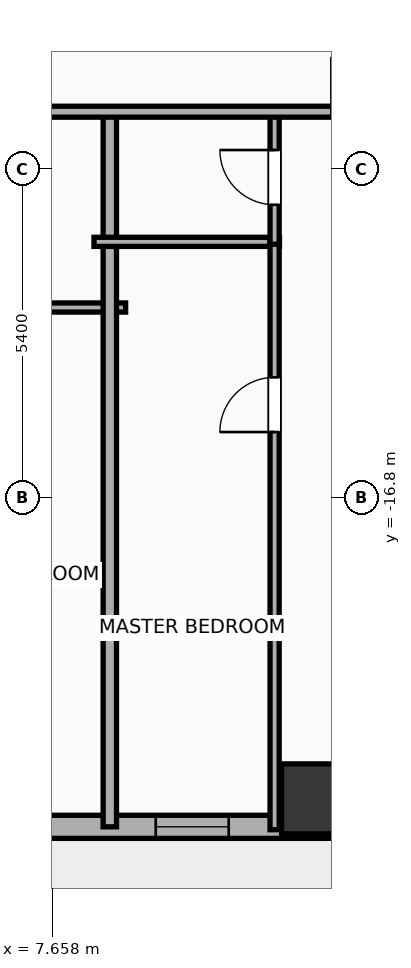
"""IFC4 building model, lengths in metres.
Left out: names, types, materials, properties, quantities, classifications, styles, units other than length and angle.
Written with IfcOpenShell. Run it as: python <this file> out.ifc"""

import sys

from ifc_helpers import new_model, si_unit, direction, frame, frame_2d, origin, origin_2d, place, context, subcontext, project, spatial, rectangle, hollow_rectangle, extrude, element, fill, save


model = new_model("IFC4")
c1 = context("Model", 3, precision=1e-05, world=origin(), true_north=direction((0.0, 1.0)))
c2 = subcontext(c1, "Body", "Model", "MODEL_VIEW")
j1 = project(units=[si_unit("LENGTHUNIT", "METRE"), si_unit("PLANEANGLEUNIT", "RADIAN")], contexts=[c1])
p1 = place(None, origin())
s1 = spatial("IfcSite", under=j1, at=p1, CompositionType="ELEMENT")
p2 = place(p1, origin())
s2 = spatial("IfcBuilding", under=s1, at=p2, CompositionType="ELEMENT")
p3 = place(p2, frame((0.0, 0.0, 26.0)))
s3 = spatial("IfcBuildingStorey", under=s2, at=p3, CompositionType="ELEMENT", Elevation=26.0)
p4 = place(p3, frame((12.0, -21.75, -0.25), z_axis=(0.0, 0.0, 1.0), x_axis=(1.0, 0.0, 0.0)))
e1 = element("IfcColumn", 1, at=p4, inside=s3, PredefinedType="COLUMN", context=c2, shape_type="SweptSolid", body=[
    extrude(hollow_rectangle(XDim=1.15, YDim=1.15, WallThickness=0.04, at=origin_2d()), origin(), (0.0, 0.0, 1.0), 4.15),
])
p5 = place(p3, frame((22.381, -22.21, 0.0), z_axis=(0.0, 0.0, 1.0), x_axis=(-1.0, 0.0, 0.0)))
e2 = element("IfcWall", 2, at=p5, inside=s3, PredefinedType="ELEMENTEDWALL", context=c2, shape_type="SweptSolid", body=[
    extrude(rectangle(XDim=51.963, YDim=0.38, at=frame_2d((25.981, 0.0))), origin(), (0.0, 0.0, 1.0), 2.54),
])
p6 = place(p5, frame((25.231, 0.0, 0.0)))
e3 = element("IfcOpeningElement", 3, at=p6, cuts=e2, PredefinedType="OPENING", context=c2, shape_type="SweptSolid", body=[
    extrude(rectangle(XDim=1.5, YDim=2.05, at=frame_2d((0.75, 1.025))), frame((0.0, 0.2, 0.0), z_axis=(0.0, -1.0, 0.0), x_axis=(1.0, 0.0, 0.0)), (0.0, 0.0, 1.0), 0.4),
])
p7 = place(p5, frame((6.61, 0.0, 0.75)))
e4 = element("IfcOpeningElement", 4, at=p7, cuts=e2, PredefinedType="OPENING", context=c2, shape_type="SweptSolid", body=[
    extrude(rectangle(XDim=2.4, YDim=1.63, at=frame_2d((1.2, 0.815))), frame((0.0, 0.2, 0.0), z_axis=(0.0, -1.0, 0.0), x_axis=(1.0, 0.0, 0.0)), (0.0, 0.0, 1.0), 0.4),
])
p8 = place(p5, frame((49.132, 0.0, 0.75)))
e5 = element("IfcOpeningElement", 5, at=p8, cuts=e2, PredefinedType="OPENING", context=c2, shape_type="SweptSolid", body=[
    extrude(rectangle(XDim=1.2, YDim=1.63, at=frame_2d((0.6, 0.815))), frame((0.0, 0.2, 0.0), z_axis=(0.0, -1.0, 0.0), x_axis=(1.0, 0.0, 0.0)), (0.0, 0.0, 1.0), 0.4),
])
p9 = place(p5, frame((46.086, 0.0, 0.75)))
e6 = element("IfcOpeningElement", 6, at=p9, cuts=e2, PredefinedType="OPENING", context=c2, shape_type="SweptSolid", body=[
    extrude(rectangle(XDim=1.2, YDim=1.63, at=frame_2d((0.6, 0.815))), frame((0.0, 0.2, 0.0), z_axis=(0.0, -1.0, 0.0), x_axis=(1.0, 0.0, 0.0)), (0.0, 0.0, 1.0), 0.4),
])
p10 = place(p5, frame((42.426, 0.0, 0.75)))
e7 = element("IfcOpeningElement", 7, at=p10, cuts=e2, PredefinedType="OPENING", context=c2, shape_type="SweptSolid", body=[
    extrude(rectangle(XDim=1.2, YDim=1.63, at=frame_2d((0.6, 0.815))), frame((0.0, 0.2, 0.0), z_axis=(0.0, -1.0, 0.0), x_axis=(1.0, 0.0, 0.0)), (0.0, 0.0, 1.0), 0.4),
])
p11 = place(p5, frame((38.286, 0.0, 0.75)))
e8 = element("IfcOpeningElement", 8, at=p11, cuts=e2, PredefinedType="OPENING", context=c2, shape_type="SweptSolid", body=[
    extrude(rectangle(XDim=1.2, YDim=1.63, at=frame_2d((0.6, 0.815))), frame((0.0, 0.2, 0.0), z_axis=(0.0, -1.0, 0.0), x_axis=(1.0, 0.0, 0.0)), (0.0, 0.0, 1.0), 0.4),
])
p12 = place(p5, frame((35.219, 0.0, 0.75)))
e9 = element("IfcOpeningElement", 9, at=p12, cuts=e2, PredefinedType="OPENING", context=c2, shape_type="SweptSolid", body=[
    extrude(rectangle(XDim=1.2, YDim=1.63, at=frame_2d((0.6, 0.815))), frame((0.0, 0.2, 0.0), z_axis=(0.0, -1.0, 0.0), x_axis=(1.0, 0.0, 0.0)), (0.0, 0.0, 1.0), 0.4),
])
p13 = place(p5, frame((32.039, 0.0, 0.75)))
e10 = element("IfcOpeningElement", 10, at=p13, cuts=e2, PredefinedType="OPENING", context=c2, shape_type="SweptSolid", body=[
    extrude(rectangle(XDim=1.2, YDim=1.63, at=frame_2d((0.6, 0.815))), frame((0.0, 0.2, 0.0), z_axis=(0.0, -1.0, 0.0), x_axis=(1.0, 0.0, 0.0)), (0.0, 0.0, 1.0), 0.4),
])
p14 = place(p5, frame((22.686, 0.0, 0.75)))
e11 = element("IfcOpeningElement", 11, at=p14, cuts=e2, PredefinedType="OPENING", context=c2, shape_type="SweptSolid", body=[
    extrude(rectangle(XDim=1.2, YDim=1.63, at=frame_2d((0.6, 0.815))), frame((0.0, 0.2, 0.0), z_axis=(0.0, -1.0, 0.0), x_axis=(1.0, 0.0, 0.0)), (0.0, 0.0, 1.0), 0.4),
])
p15 = place(p5, frame((18.786, 0.0, 0.75)))
e12 = element("IfcOpeningElement", 12, at=p15, cuts=e2, PredefinedType="OPENING", context=c2, shape_type="SweptSolid", body=[
    extrude(rectangle(XDim=1.2, YDim=1.63, at=frame_2d((0.6, 0.815))), frame((0.0, 0.2, 0.0), z_axis=(0.0, -1.0, 0.0), x_axis=(1.0, 0.0, 0.0)), (0.0, 0.0, 1.0), 0.4),
])
p16 = place(p5, frame((14.886, 0.0, 0.75)))
e13 = element("IfcOpeningElement", 13, at=p16, cuts=e2, PredefinedType="OPENING", context=c2, shape_type="SweptSolid", body=[
    extrude(rectangle(XDim=1.2, YDim=1.63, at=frame_2d((0.6, 0.815))), frame((0.0, 0.2, 0.0), z_axis=(0.0, -1.0, 0.0), x_axis=(1.0, 0.0, 0.0)), (0.0, 0.0, 1.0), 0.4),
])
p17 = place(p5, frame((11.826, 0.0, 0.75)))
e14 = element("IfcOpeningElement", 14, at=p17, cuts=e2, PredefinedType="OPENING", context=c2, shape_type="SweptSolid", body=[
    extrude(rectangle(XDim=1.2, YDim=1.63, at=frame_2d((0.6, 0.815))), frame((0.0, 0.2, 0.0), z_axis=(0.0, -1.0, 0.0), x_axis=(1.0, 0.0, 0.0)), (0.0, 0.0, 1.0), 0.4),
])
p18 = place(p5, frame((2.836, 0.0, 0.75)))
e15 = element("IfcOpeningElement", 15, at=p18, cuts=e2, PredefinedType="OPENING", context=c2, shape_type="SweptSolid", body=[
    extrude(rectangle(XDim=1.2, YDim=1.63, at=frame_2d((0.6, 0.815))), frame((0.0, 0.2, 0.0), z_axis=(0.0, -1.0, 0.0), x_axis=(1.0, 0.0, 0.0)), (0.0, 0.0, 1.0), 0.4),
])
p19 = place(p3, frame((5.07, -13.67, 0.0), z_axis=(0.0, 0.0, 1.0), x_axis=(1.0, 0.0, 0.0)))
e16 = element("IfcWall", 16, at=p19, inside=s3, PredefinedType="PLUMBINGWALL", context=c2, shape_type="SweptSolid", body=[
    extrude(rectangle(XDim=3.79, YDim=0.15, at=frame_2d((1.895, 0.0))), origin(), (0.0, 0.0, 1.0), 3.65),
])
p20 = place(p3, frame((8.6, -22.21, 0.0), z_axis=(0.0, 0.0, 1.0), x_axis=(0.0, 1.0, 0.0)))
e17 = element("IfcWall", 17, at=p20, inside=s3, PredefinedType="PARTITIONING", context=c2, shape_type="SweptSolid", body=[
    extrude(rectangle(XDim=11.84, YDim=0.22, at=frame_2d((5.92, 0.0))), origin(), (0.0, 0.0, 1.0), 3.65),
])
p21 = place(p3, frame((8.34, -12.59, 0.0), z_axis=(0.0, 0.0, 1.0), x_axis=(1.0, 0.0, 0.0)))
e18 = element("IfcWall", 18, at=p21, inside=s3, PredefinedType="PLUMBINGWALL", context=c2, shape_type="SweptSolid", body=[
    extrude(rectangle(XDim=3.05, YDim=0.15, at=frame_2d((1.525, 0.0))), origin(), (0.0, 0.0, 1.0), 3.65),
])
p22 = place(p3, frame((11.31, -22.258, 0.0), z_axis=(0.0, 0.0, 1.0), x_axis=(0.0, 1.0, 0.0)))
e19 = element("IfcWall", 19, at=p22, inside=s3, PredefinedType="PLUMBINGWALL", context=c2, shape_type="SweptSolid", body=[
    extrude(rectangle(XDim=9.708, YDim=0.15, at=frame_2d((4.854, 0.0))), origin(), (0.0, 0.0, 1.0), 3.65),
])
p23 = place(p22, frame((6.54, 0.0, 0.0)))
e20 = element("IfcOpeningElement", 20, at=p23, cuts=e19, PredefinedType="OPENING", context=c2, shape_type="SweptSolid", body=[
    extrude(rectangle(XDim=0.9, YDim=2.05, at=frame_2d((0.45, 1.025))), frame((0.0, 0.085, 0.0), z_axis=(0.0, -1.0, 0.0), x_axis=(1.0, 0.0, 0.0)), (0.0, 0.0, 1.0), 0.17),
])
p24 = place(p3, frame((11.31, -12.63, 0.0), z_axis=(0.0, 0.0, 1.0), x_axis=(0.0, 1.0, 0.0)))
e21 = element("IfcWall", 21, at=p24, inside=s3, PredefinedType="PLUMBINGWALL", context=c2, shape_type="SweptSolid", body=[
    extrude(rectangle(XDim=2.2, YDim=0.15, at=frame_2d((1.1, 0.0))), origin(), (0.0, 0.0, 1.0), 3.65),
])
p25 = place(p24, frame((0.65, 0.0, 0.0)))
e22 = element("IfcOpeningElement", 22, at=p25, cuts=e21, PredefinedType="OPENING", context=c2, shape_type="SweptSolid", body=[
    extrude(rectangle(XDim=0.9, YDim=2.05, at=frame_2d((0.45, 1.025))), frame((0.0, 0.085, 0.0), z_axis=(0.0, -1.0, 0.0), x_axis=(1.0, 0.0, 0.0)), (0.0, 0.0, 1.0), 0.17),
])
p26 = place(p3, frame((-33.41, -10.45, 0.0), z_axis=(0.0, 0.0, 1.0), x_axis=(1.0, 0.0, 0.0)))
e23 = element("IfcWall", 23, at=p26, inside=s3, PredefinedType="PARTITIONING", context=c2, shape_type="SweptSolid", body=[
    extrude(rectangle(XDim=59.62, YDim=0.18, at=frame_2d((29.81, 0.0))), origin(), (0.0, 0.0, 1.0), 3.65),
])
p27 = place(p26, frame((5.321, 0.0, 0.0)))
e24 = element("IfcOpeningElement", 24, at=p27, cuts=e23, PredefinedType="OPENING", context=c2, shape_type="SweptSolid", body=[
    extrude(rectangle(XDim=1.15, YDim=2.05, at=frame_2d((0.575, 1.025))), frame((0.0, 0.1, 0.0), z_axis=(0.0, -1.0, 0.0), x_axis=(1.0, 0.0, 0.0)), (0.0, 0.0, 1.0), 0.2),
])
p28 = place(p26, frame((14.3, 0.0, 0.0)))
e25 = element("IfcOpeningElement", 25, at=p28, cuts=e23, PredefinedType="OPENING", context=c2, shape_type="SweptSolid", body=[
    extrude(rectangle(XDim=1.15, YDim=2.05, at=frame_2d((0.575, 1.025))), frame((0.0, 0.1, 0.0), z_axis=(0.0, -1.0, 0.0), x_axis=(1.0, 0.0, 0.0)), (0.0, 0.0, 1.0), 0.2),
])
p29 = place(p26, frame((22.265, 0.0, 0.0)))
e26 = element("IfcOpeningElement", 26, at=p29, cuts=e23, PredefinedType="OPENING", context=c2, shape_type="SweptSolid", body=[
    extrude(rectangle(XDim=0.9, YDim=2.05, at=frame_2d((0.45, 1.025))), frame((0.0, 0.1, 0.0), z_axis=(0.0, -1.0, 0.0), x_axis=(1.0, 0.0, 0.0)), (0.0, 0.0, 1.0), 0.2),
])
p30 = place(p26, frame((29.903, 0.0, 0.0)))
e27 = element("IfcOpeningElement", 27, at=p30, cuts=e23, PredefinedType="OPENING", context=c2, shape_type="SweptSolid", body=[
    extrude(rectangle(XDim=1.15, YDim=2.05, at=frame_2d((0.575, 1.025))), frame((0.0, 0.1, 0.0), z_axis=(0.0, -1.0, 0.0), x_axis=(1.0, 0.0, 0.0)), (0.0, 0.0, 1.0), 0.2),
])
p31 = place(p26, frame((37.701, 0.0, 0.0)))
e28 = element("IfcOpeningElement", 28, at=p31, cuts=e23, PredefinedType="OPENING", context=c2, shape_type="SweptSolid", body=[
    extrude(rectangle(XDim=1.15, YDim=2.05, at=frame_2d((0.575, 1.025))), frame((0.0, 0.1, 0.0), z_axis=(0.0, -1.0, 0.0), x_axis=(1.0, 0.0, 0.0)), (0.0, 0.0, 1.0), 0.2),
])
p32 = place(p26, frame((45.654, 0.0, 0.0)))
e29 = element("IfcOpeningElement", 29, at=p32, cuts=e23, PredefinedType="OPENING", context=c2, shape_type="SweptSolid", body=[
    extrude(rectangle(XDim=0.9, YDim=2.05, at=frame_2d((0.45, 1.025))), frame((0.0, 0.1, 0.0), z_axis=(0.0, -1.0, 0.0), x_axis=(1.0, 0.0, 0.0)), (0.0, 0.0, 1.0), 0.2),
])
p33 = place(p26, frame((54.472, 0.0, 0.0)))
e30 = element("IfcOpeningElement", 30, at=p33, cuts=e23, PredefinedType="OPENING", context=c2, shape_type="SweptSolid", body=[
    extrude(rectangle(XDim=1.15, YDim=2.05, at=frame_2d((0.575, 1.025))), frame((0.0, 0.1, 0.0), z_axis=(0.0, -1.0, 0.0), x_axis=(1.0, 0.0, 0.0)), (0.0, 0.0, 1.0), 0.2),
])
p34 = place(p17, origin())
e31 = element("IfcWindow", 31, at=p34, inside=s3, PartitioningType="SINGLE_PANEL", PredefinedType="WINDOW", context=c2, shape_type="SweptSolid", body=[
    extrude(rectangle(XDim=1.2, YDim=1.63, at=frame_2d((0.6, 0.815))), frame((0.0, 0.03, 0.0), z_axis=(0.0, -1.0, 0.0), x_axis=(1.0, 0.0, 0.0)), (0.0, 0.0, 1.0), 0.06),
])
fill(e14, e31)
p35 = place(p23, origin())
e32 = element("IfcDoor", 32, at=p35, inside=s3, OperationType="SINGLE_SWING_LEFT", PredefinedType="DOOR", context=c2, shape_type="SweptSolid", body=[
    extrude(rectangle(XDim=0.9, YDim=2.05, at=frame_2d((0.45, 1.025))), frame((0.0, 0.025, 0.0), z_axis=(0.0, -1.0, 0.0), x_axis=(1.0, 0.0, 0.0)), (0.0, 0.0, 1.0), 0.05),
])
fill(e20, e32)
p36 = place(p25, origin())
e33 = element("IfcDoor", 33, at=p36, inside=s3, OperationType="SINGLE_SWING_RIGHT", PredefinedType="DOOR", context=c2, shape_type="SweptSolid", body=[
    extrude(rectangle(XDim=0.9, YDim=2.05, at=frame_2d((0.45, 1.025))), frame((0.0, 0.025, 0.0), z_axis=(0.0, -1.0, 0.0), x_axis=(1.0, 0.0, 0.0)), (0.0, 0.0, 1.0), 0.05),
])
fill(e22, e33)
p37 = place(p32, origin())
e34 = element("IfcDoor", 34, at=p37, inside=s3, OperationType="SINGLE_SWING_LEFT", PredefinedType="DOOR", context=c2, shape_type="SweptSolid", body=[
    extrude(rectangle(XDim=0.9, YDim=2.05, at=frame_2d((0.45, 1.025))), frame((0.0, 0.025, 0.0), z_axis=(0.0, -1.0, 0.0), x_axis=(1.0, 0.0, 0.0)), (0.0, 0.0, 1.0), 0.05),
])
fill(e29, e34)
save(model, sys.argv[1])
